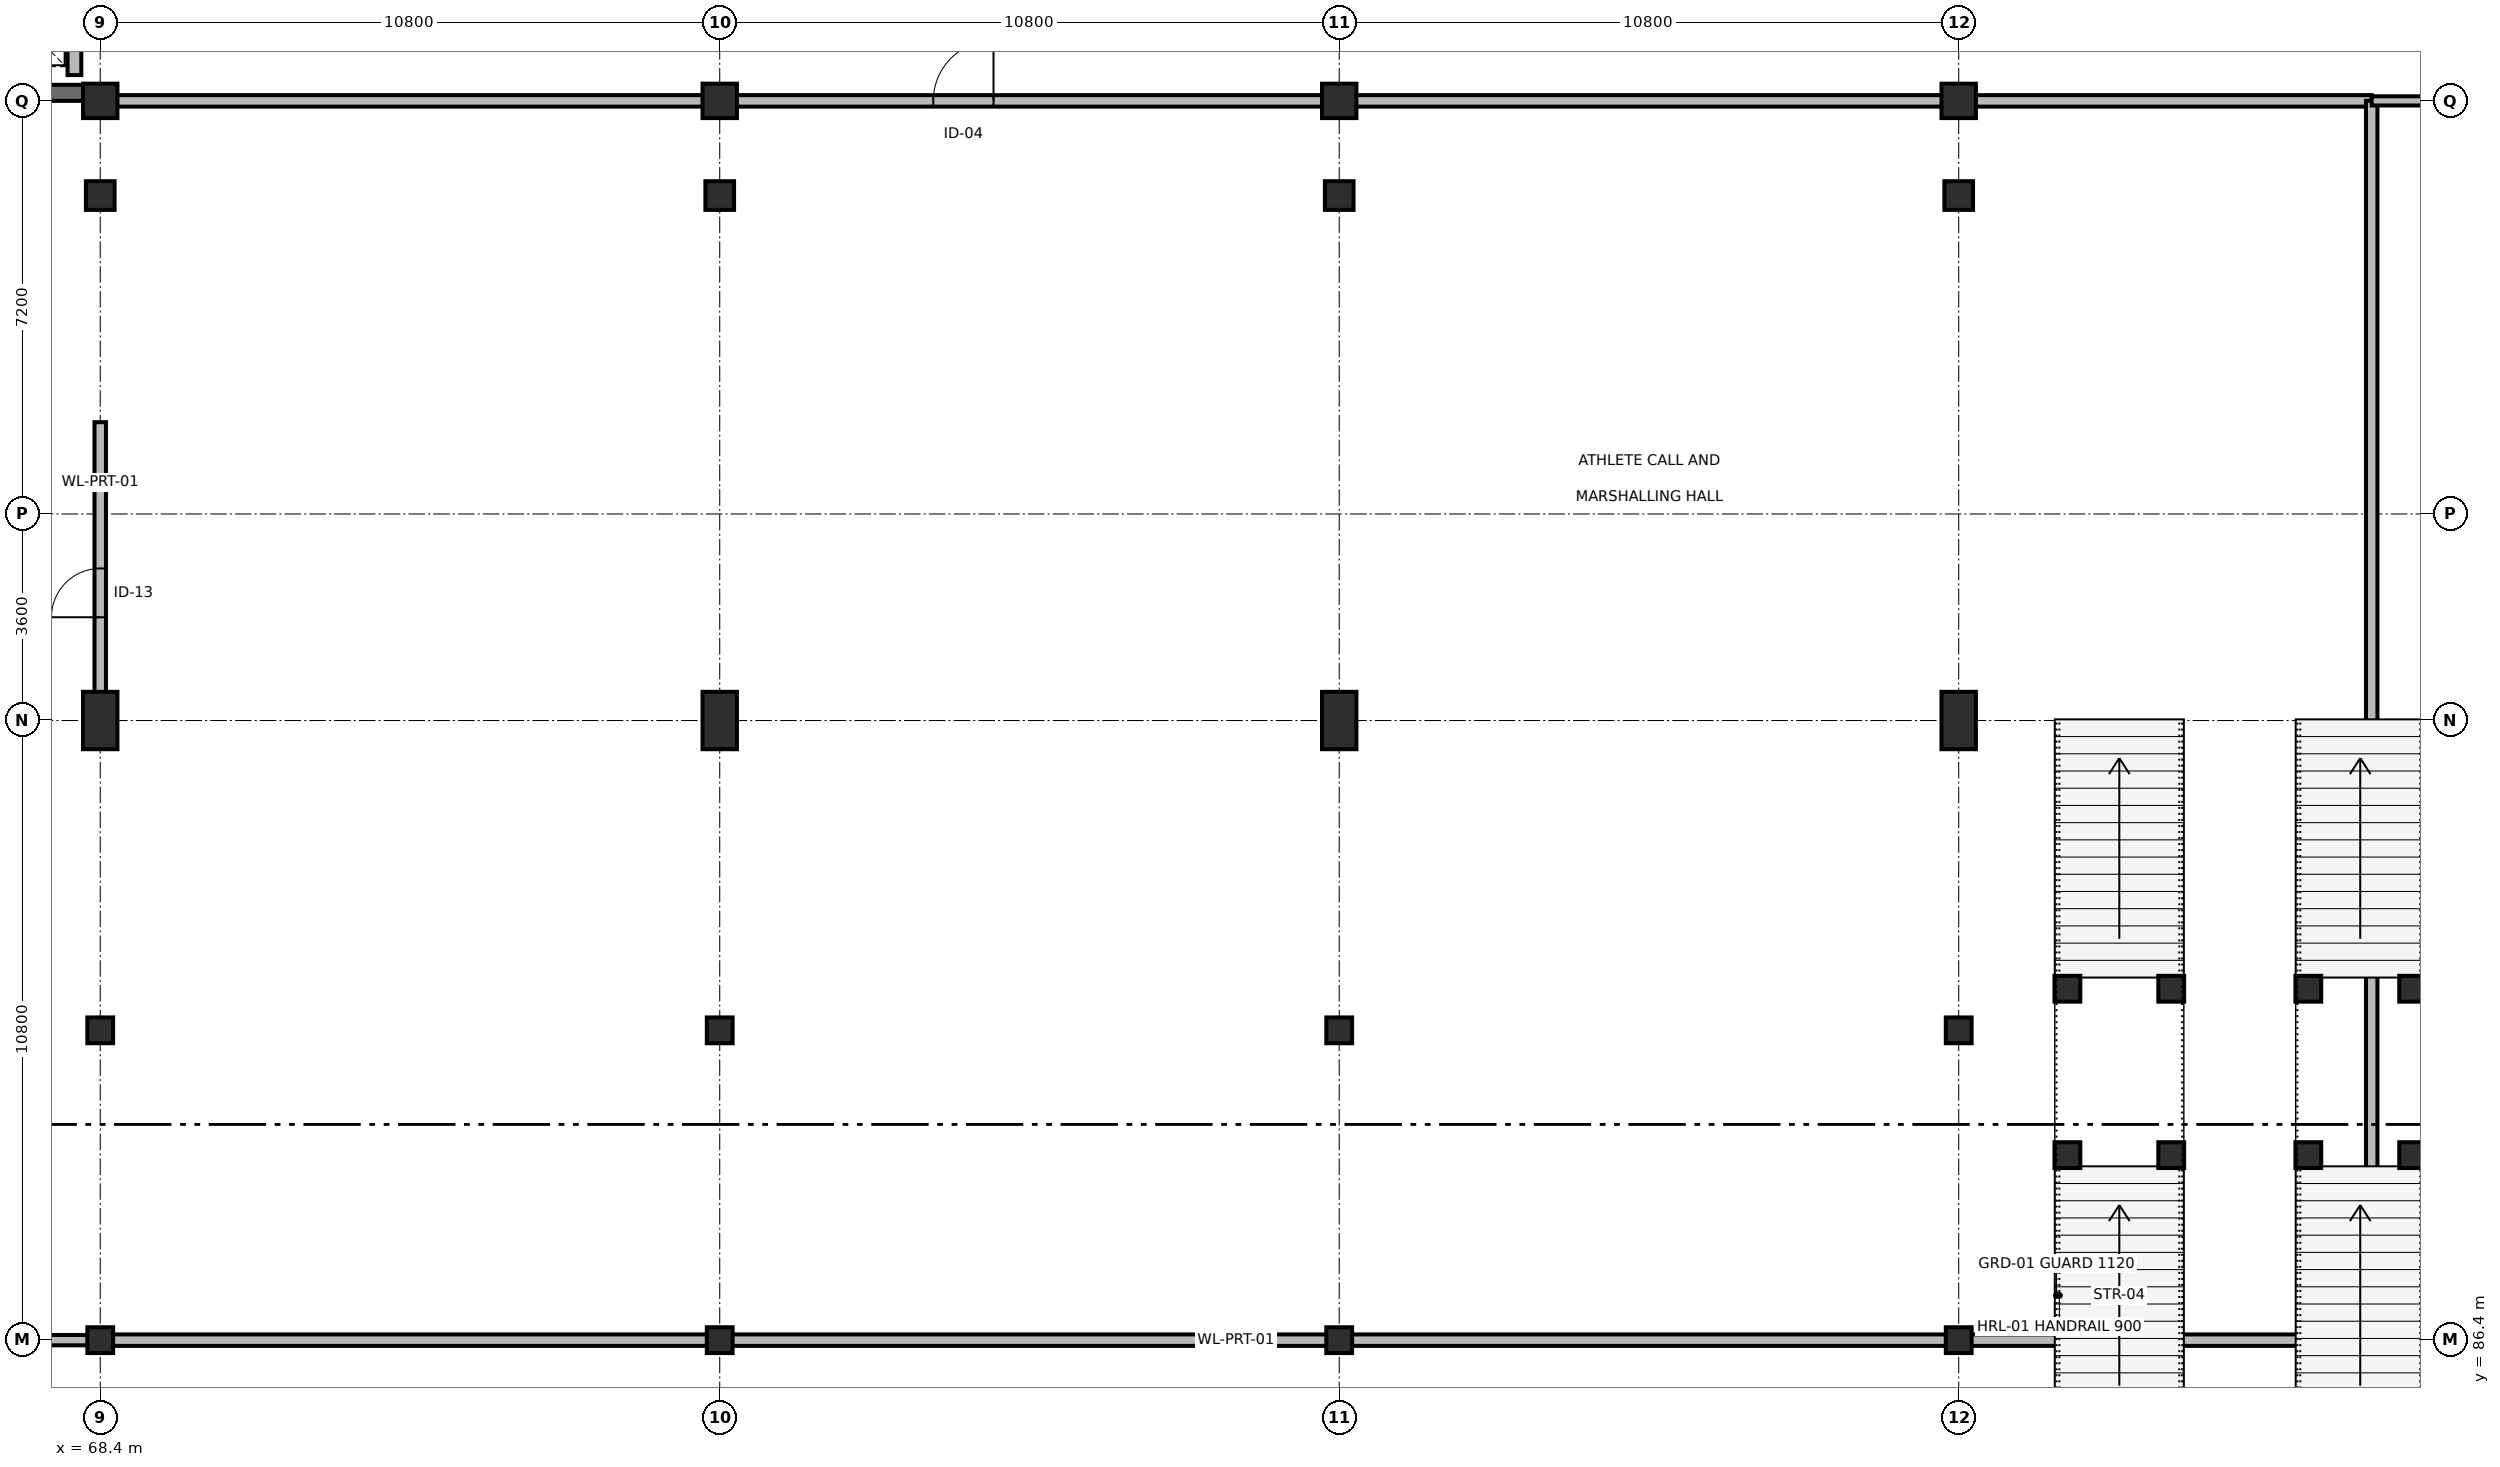
"""IFC4 building model, lengths in metres.
Left out: names, types, materials, properties, quantities, classifications, styles, units other than length and angle.
Written with IfcOpenShell. Run it as: python <this file> out.ifc"""

import sys

from ifc_helpers import new_model, si_unit, direction, frame, frame_2d, origin, origin_2d, place, context, subcontext, project, spatial, rectangle, extrude, element, fill, save


model = new_model("IFC4")
c1 = context("Model", 3, precision=1e-05, world=origin(), true_north=direction((0.0, 1.0)))
c2 = subcontext(c1, "Body", "Model", "MODEL_VIEW")
j1 = project(units=[si_unit("LENGTHUNIT", "METRE"), si_unit("PLANEANGLEUNIT", "RADIAN")], contexts=[c1])
p1 = place(None, origin())
s1 = spatial("IfcSite", under=j1, at=p1, CompositionType="ELEMENT")
p2 = place(p1, origin())
s2 = spatial("IfcBuilding", under=s1, at=p2, CompositionType="ELEMENT")
p3 = place(p2, origin())
s3 = spatial("IfcBuildingStorey", under=s2, at=p3, CompositionType="ELEMENT", Elevation=0.0)
for number, where, z_axis, x_axis in (
    (1, (68.4, 97.2, 0.0), (0.0, 0.0, 1.0), (1.0, 0.0, 0.0)),
    (2, (79.2, 97.2, 0.0), (0.0, 0.0, 1.0), (1.0, 0.0, 0.0)),
    (3, (90.0, 97.2, 0.0), (0.0, 0.0, 1.0), (1.0, 0.0, 0.0)),
    (4, (100.8, 97.2, 0.0), (0.0, 0.0, 1.0), (1.0, 0.0, 0.0)),
):
    element("IfcColumn", number, at=place(p3, frame(where, z_axis=z_axis, x_axis=x_axis)), inside=s3, PredefinedType="COLUMN", context=c2, shape_type="SweptSolid", body=[
        extrude(rectangle(XDim=0.6, YDim=1.0, at=origin_2d()), origin(), (0.0, 0.0, 1.0), 4.8),
    ])
for number, where, z_axis, x_axis in (
    (5, (68.4, 108.0, 0.0), (0.0, 0.0, 1.0), (1.0, 0.0, 0.0)),
    (6, (79.2, 108.0, 0.0), (0.0, 0.0, 1.0), (1.0, 0.0, 0.0)),
    (7, (90.0, 108.0, 0.0), (0.0, 0.0, 1.0), (1.0, 0.0, 0.0)),
    (8, (100.8, 108.0, 0.0), (0.0, 0.0, 1.0), (1.0, 0.0, 0.0)),
):
    element("IfcColumn", number, at=place(p3, frame(where, z_axis=z_axis, x_axis=x_axis)), inside=s3, PredefinedType="COLUMN", context=c2, shape_type="SweptSolid", body=[
        extrude(rectangle(XDim=0.6, YDim=0.6, at=origin_2d()), origin(), (0.0, 0.0, 1.0), 4.8),
    ])
for number, where, z_axis, x_axis in (
    (9, (68.4, 106.35, 0.0), (0.0, 0.0, 1.0), (1.0, 0.0, 0.0)),
    (10, (79.2, 106.35, 0.0), (0.0, 0.0, 1.0), (1.0, 0.0, 0.0)),
    (11, (90.0, 106.35, 0.0), (0.0, 0.0, 1.0), (1.0, 0.0, 0.0)),
    (12, (100.8, 106.35, 0.0), (0.0, 0.0, 1.0), (1.0, 0.0, 0.0)),
):
    element("IfcColumn", number, at=place(p3, frame(where, z_axis=z_axis, x_axis=x_axis)), inside=s3, PredefinedType="COLUMN", context=c2, shape_type="SweptSolid", body=[
        extrude(rectangle(XDim=0.5, YDim=0.5, at=origin_2d()), origin(), (0.0, 0.0, 1.0), 4.8),
    ])
p4 = place(p3, frame((68.4, 86.4, 0.0), z_axis=(0.0, 0.0, 1.0), x_axis=(1.0, 0.0, 0.0)))
e13 = element("IfcColumn", 13, at=p4, inside=s3, PredefinedType="COLUMN", context=c2, shape_type="SweptSolid", body=[
    extrude(rectangle(XDim=0.45, YDim=0.45, at=origin_2d()), origin(), (0.0, 0.0, 1.0), 2.85),
])
p5 = place(p3, frame((68.4, 91.8, 0.0), z_axis=(0.0, 0.0, 1.0), x_axis=(1.0, 0.0, 0.0)))
e14 = element("IfcColumn", 14, at=p5, inside=s3, PredefinedType="COLUMN", context=c2, shape_type="SweptSolid", body=[
    extrude(rectangle(XDim=0.45, YDim=0.45, at=origin_2d()), origin(), (0.0, 0.0, 1.0), 4.5),
])
p6 = place(p3, frame((79.2, 86.4, 0.0), z_axis=(0.0, 0.0, 1.0), x_axis=(1.0, 0.0, 0.0)))
e15 = element("IfcColumn", 15, at=p6, inside=s3, PredefinedType="COLUMN", context=c2, shape_type="SweptSolid", body=[
    extrude(rectangle(XDim=0.45, YDim=0.45, at=origin_2d()), origin(), (0.0, 0.0, 1.0), 2.85),
])
p7 = place(p3, frame((79.2, 91.8, 0.0), z_axis=(0.0, 0.0, 1.0), x_axis=(1.0, 0.0, 0.0)))
e16 = element("IfcColumn", 16, at=p7, inside=s3, PredefinedType="COLUMN", context=c2, shape_type="SweptSolid", body=[
    extrude(rectangle(XDim=0.45, YDim=0.45, at=origin_2d()), origin(), (0.0, 0.0, 1.0), 4.5),
])
p8 = place(p3, frame((90.0, 86.4, 0.0), z_axis=(0.0, 0.0, 1.0), x_axis=(1.0, 0.0, 0.0)))
e17 = element("IfcColumn", 17, at=p8, inside=s3, PredefinedType="COLUMN", context=c2, shape_type="SweptSolid", body=[
    extrude(rectangle(XDim=0.45, YDim=0.45, at=origin_2d()), origin(), (0.0, 0.0, 1.0), 2.85),
])
p9 = place(p3, frame((90.0, 91.8, 0.0), z_axis=(0.0, 0.0, 1.0), x_axis=(1.0, 0.0, 0.0)))
e18 = element("IfcColumn", 18, at=p9, inside=s3, PredefinedType="COLUMN", context=c2, shape_type="SweptSolid", body=[
    extrude(rectangle(XDim=0.45, YDim=0.45, at=origin_2d()), origin(), (0.0, 0.0, 1.0), 4.5),
])
p10 = place(p3, frame((100.8, 86.4, 0.0), z_axis=(0.0, 0.0, 1.0), x_axis=(1.0, 0.0, 0.0)))
e19 = element("IfcColumn", 19, at=p10, inside=s3, PredefinedType="COLUMN", context=c2, shape_type="SweptSolid", body=[
    extrude(rectangle(XDim=0.45, YDim=0.45, at=origin_2d()), origin(), (0.0, 0.0, 1.0), 2.85),
])
p11 = place(p3, frame((100.8, 91.8, 0.0), z_axis=(0.0, 0.0, 1.0), x_axis=(1.0, 0.0, 0.0)))
e20 = element("IfcColumn", 20, at=p11, inside=s3, PredefinedType="COLUMN", context=c2, shape_type="SweptSolid", body=[
    extrude(rectangle(XDim=0.45, YDim=0.45, at=origin_2d()), origin(), (0.0, 0.0, 1.0), 4.5),
])
for number, where, z_axis, x_axis in (
    (21, (102.695, 89.625, 0.0), (0.0, 0.0, 1.0), (1.0, 0.0, 0.0)),
    (22, (102.695, 92.525, 0.0), (0.0, 0.0, 1.0), (1.0, 0.0, 0.0)),
    (23, (104.505, 89.625, 0.0), (0.0, 0.0, 1.0), (1.0, 0.0, 0.0)),
    (24, (104.505, 92.525, 0.0), (0.0, 0.0, 1.0), (1.0, 0.0, 0.0)),
    (25, (106.895, 89.625, 0.0), (0.0, 0.0, 1.0), (1.0, 0.0, 0.0)),
    (26, (106.895, 92.525, 0.0), (0.0, 0.0, 1.0), (1.0, 0.0, 0.0)),
    (27, (108.705, 89.625, 0.0), (0.0, 0.0, 1.0), (1.0, 0.0, 0.0)),
    (28, (108.705, 92.525, 0.0), (0.0, 0.0, 1.0), (1.0, 0.0, 0.0)),
):
    element("IfcColumn", number, at=place(p3, frame(where, z_axis=z_axis, x_axis=x_axis)), inside=s3, PredefinedType="COLUMN", context=c2, shape_type="SweptSolid", body=[
        extrude(rectangle(XDim=0.45, YDim=0.45, at=origin_2d()), origin(), (0.0, 0.0, 1.0), 2.24),
    ])
p12 = place(p3, frame((57.6, 108.14, 0.0), z_axis=(0.0, 0.0, 1.0), x_axis=(1.0, 0.0, 0.0)))
e29 = element("IfcWall", 29, at=p12, inside=s3, PredefinedType="SHEAR", context=c2, shape_type="SweptSolid", body=[
    extrude(rectangle(XDim=10.8, YDim=0.28, at=frame_2d((5.4, 0.0))), origin(), (0.0, 0.0, 1.0), 4.8),
])
p13 = place(p3, frame((67.95, 108.45, 0.0), z_axis=(0.0, 0.0, 1.0), x_axis=(0.0, 1.0, 0.0)))
e30 = element("IfcWall", 30, at=p13, inside=s3, PredefinedType="SOLIDWALL", context=c2, shape_type="SweptSolid", body=[
    extrude(rectangle(XDim=3.0, YDim=0.24, at=frame_2d((1.5, 0.0))), origin(), (0.0, 0.0, 1.0), 4.505),
])
p14 = place(p3, frame((68.4, 96.8, 0.0), z_axis=(0.0, 0.0, 1.0), x_axis=(0.0, 1.0, 0.0)))
e31 = element("IfcWall", 31, at=p14, inside=s3, PredefinedType="PARTITIONING", context=c2, shape_type="SweptSolid", body=[
    extrude(rectangle(XDim=5.6, YDim=0.2, at=frame_2d((2.8, 0.0))), origin(), (0.0, 0.0, 1.0), 2.215),
])
p15 = place(p14, frame((2.2, 0.0, 0.0)))
e32 = element("IfcOpeningElement", 32, at=p15, cuts=e31, PredefinedType="OPENING", context=c2, shape_type="SweptSolid", body=[
    extrude(rectangle(XDim=0.85, YDim=2.05, at=frame_2d((0.425, 1.025))), frame((0.0, 0.11, 0.0), z_axis=(0.0, -1.0, 0.0), x_axis=(1.0, 0.0, 0.0)), (0.0, 0.0, 1.0), 0.22),
])
p16 = place(p3, frame((68.4, 86.4, 0.0), z_axis=(0.0, 0.0, 1.0), x_axis=(1.0, 0.0, 0.0)))
e33 = element("IfcWall", 33, at=p16, inside=s3, PredefinedType="PARTITIONING", context=c2, shape_type="SweptSolid", body=[
    extrude(rectangle(XDim=39.6, YDim=0.2, at=frame_2d((19.8, 0.0))), origin(), (0.0, 0.0, 1.0), 2.095),
])
p17 = place(p3, frame((68.4, 108.0, 0.0), z_axis=(0.0, 0.0, 1.0), x_axis=(1.0, 0.0, 0.0)))
e34 = element("IfcWall", 34, at=p17, inside=s3, PredefinedType="PARTITIONING", context=c2, shape_type="SweptSolid", body=[
    extrude(rectangle(XDim=39.6, YDim=0.2, at=frame_2d((19.8, 0.0))), origin(), (0.0, 0.0, 1.0), 2.905),
])
p18 = place(p17, frame((14.523, 0.0, 0.0)))
e35 = element("IfcOpeningElement", 35, at=p18, cuts=e34, PredefinedType="OPENING", context=c2, shape_type="SweptSolid", body=[
    extrude(rectangle(XDim=1.05, YDim=2.15, at=frame_2d((0.525, 1.075))), frame((0.0, 0.11, 0.0), z_axis=(0.0, -1.0, 0.0), x_axis=(1.0, 0.0, 0.0)), (0.0, 0.0, 1.0), 0.22),
])
p19 = place(p3, frame((108.0, 86.4, 0.0), z_axis=(0.0, 0.0, 1.0), x_axis=(0.0, 1.0, 0.0)))
e36 = element("IfcWall", 36, at=p19, inside=s3, PredefinedType="PARTITIONING", context=c2, shape_type="SweptSolid", body=[
    extrude(rectangle(XDim=21.6, YDim=0.2, at=frame_2d((10.8, 0.0))), origin(), (0.0, 0.0, 1.0), 2.905),
])
p20 = place(p3, frame((46.8, 86.4, 0.0), z_axis=(0.0, 0.0, 1.0), x_axis=(1.0, 0.0, 0.0)))
e37 = element("IfcWall", 37, at=p20, inside=s3, PredefinedType="PARTITIONING", context=c2, shape_type="SweptSolid", body=[
    extrude(rectangle(XDim=21.6, YDim=0.18, at=frame_2d((10.8, 0.0))), origin(), (0.0, 0.0, 1.0), 2.195),
])
p21 = place(p3, frame((108.0, 86.4, 0.0), z_axis=(0.0, 0.0, 1.0), x_axis=(1.0, 0.0, 0.0)))
e38 = element("IfcWall", 38, at=p21, inside=s3, PredefinedType="PARTITIONING", context=c2, shape_type="SweptSolid", body=[
    extrude(rectangle(XDim=25.2, YDim=0.16, at=frame_2d((12.6, 0.0))), origin(), (0.0, 0.0, 1.0), 2.195),
])
p22 = place(p21, frame((19.156, 0.0, 0.0)))
e39 = element("IfcOpeningElement", 39, at=p22, cuts=e38, PredefinedType="OPENING", context=c2, shape_type="SweptSolid", body=[
    extrude(rectangle(XDim=1.0, YDim=2.1, at=frame_2d((0.5, 1.05))), frame((0.0, 0.09, 0.0), z_axis=(0.0, -1.0, 0.0), x_axis=(1.0, 0.0, 0.0)), (0.0, 0.0, 1.0), 0.18),
])
p23 = place(p3, frame((108.0, 108.0, 0.0), z_axis=(0.0, 0.0, 1.0), x_axis=(1.0, 0.0, 0.0)))
e40 = element("IfcWall", 40, at=p23, inside=s3, PredefinedType="PARTITIONING", context=c2, shape_type="SweptSolid", body=[
    extrude(rectangle(XDim=25.2, YDim=0.16, at=frame_2d((12.6, 0.0))), origin(), (0.0, 0.0, 1.0), 2.905),
])
p24 = place(p15, origin())
e41 = element("IfcDoor", 41, at=p24, inside=s3, OperationType="SINGLE_SWING_LEFT", PredefinedType="DOOR", context=c2, shape_type="SweptSolid", body=[
    extrude(rectangle(XDim=0.85, YDim=2.05, at=frame_2d((0.425, 1.025))), frame((0.0, 0.025, 0.0), z_axis=(0.0, -1.0, 0.0), x_axis=(1.0, 0.0, 0.0)), (0.0, 0.0, 1.0), 0.05),
])
fill(e32, e41)
p25 = place(p18, origin())
e42 = element("IfcDoor", 42, at=p25, inside=s3, OperationType="SINGLE_SWING_RIGHT", PredefinedType="DOOR", context=c2, shape_type="SweptSolid", body=[
    extrude(rectangle(XDim=1.05, YDim=2.15, at=frame_2d((0.525, 1.075))), frame((0.0, 0.025, 0.0), z_axis=(0.0, -1.0, 0.0), x_axis=(1.0, 0.0, 0.0)), (0.0, 0.0, 1.0), 0.05),
])
fill(e35, e42)
save(model, sys.argv[1])
